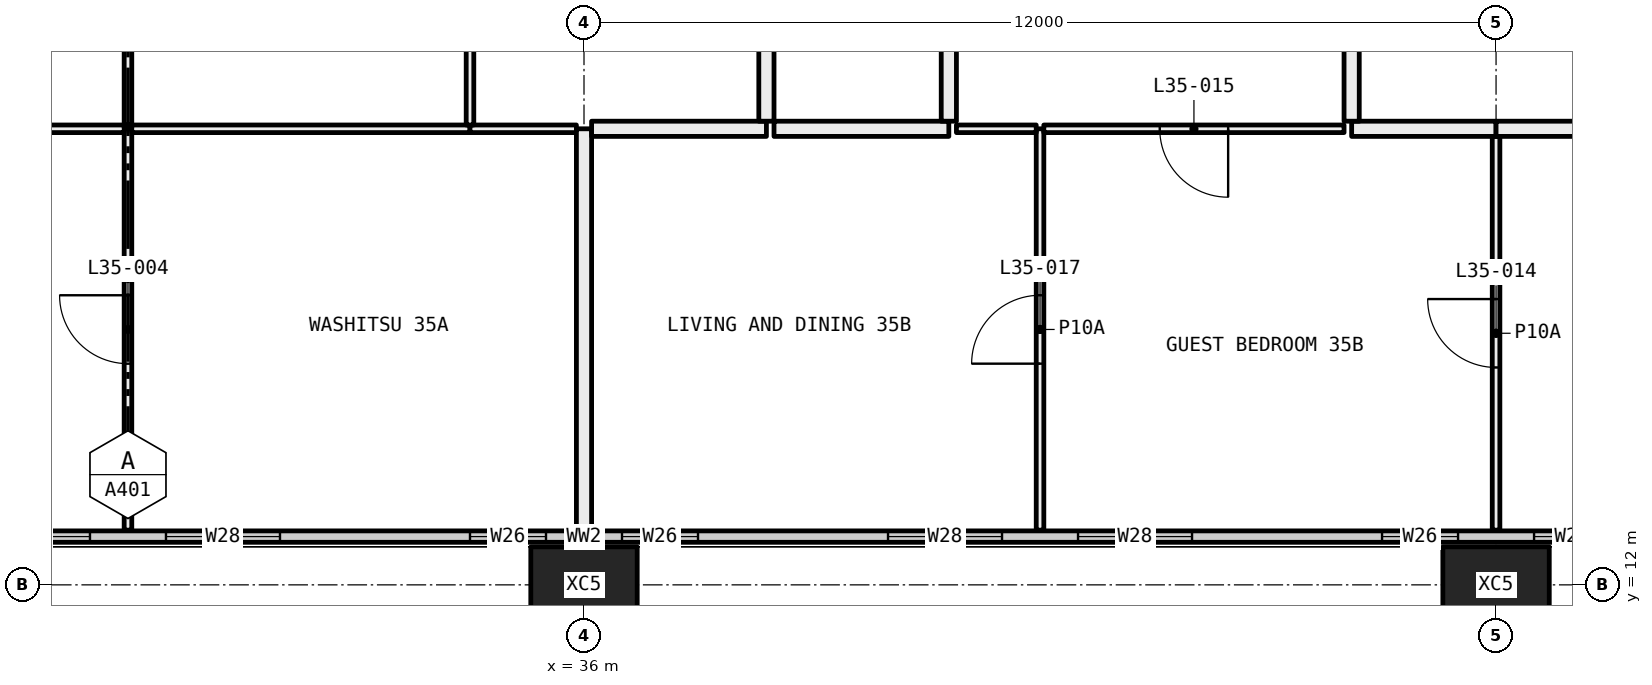
"""IFC4 building model, lengths in metres.
Left out: names, types, materials, properties, quantities, classifications, styles, units other than length and angle.
Written with IfcOpenShell. Run it as: python <this file> out.ifc"""

import sys

from ifc_helpers import new_model, si_unit, direction, frame, frame_2d, origin, origin_2d, place, context, subcontext, project, spatial, rectangle, hollow_rectangle, extrude, element, fill, save


model = new_model("IFC4")
c1 = context("Model", 3, precision=1e-05, world=origin(), true_north=direction((0.0, 1.0)))
c2 = subcontext(c1, "Body", "Model", "MODEL_VIEW")
j1 = project(units=[si_unit("LENGTHUNIT", "METRE"), si_unit("PLANEANGLEUNIT", "RADIAN")], contexts=[c1])
p1 = place(None, origin())
s1 = spatial("IfcSite", under=j1, at=p1, CompositionType="ELEMENT")
p2 = place(p1, origin())
s2 = spatial("IfcBuilding", under=s1, at=p2, CompositionType="ELEMENT")
p3 = place(p2, frame((0.0, 0.0, 134.55)))
s3 = spatial("IfcBuildingStorey", under=s2, at=p3, CompositionType="ELEMENT", Elevation=134.55)
for number, where, z_axis, x_axis in (
    (1, (36.0, 12.0, -0.4), (0.0, 0.0, 1.0), (1.0, 0.0, 0.0)),
    (2, (48.0, 12.0, -0.4), (0.0, 0.0, 1.0), (1.0, 0.0, 0.0)),
):
    element("IfcColumn", number, at=place(p3, frame(where, z_axis=z_axis, x_axis=x_axis)), inside=s3, PredefinedType="COLUMN", context=c2, shape_type="SweptSolid", body=[
        extrude(hollow_rectangle(XDim=1.4, YDim=1.0, WallThickness=0.055, at=origin_2d()), origin(), (0.0, 0.0, 1.0), 3.45),
    ])
p4 = place(p3, frame((6.56, 12.635, 0.0), z_axis=(0.0, 0.0, 1.0), x_axis=(1.0, 0.0, 0.0)))
e3 = element("IfcWall", 3, at=p4, inside=s3, PredefinedType="ELEMENTEDWALL", context=c2, shape_type="SweptSolid", body=[
    extrude(rectangle(XDim=58.88, YDim=0.15, at=frame_2d((29.44, 0.0))), origin(), (0.0, 0.0, 1.0), 3.05),
])
p5 = place(p4, frame((0.44, 0.0, 0.45)))
e4 = element("IfcOpeningElement", 4, at=p5, cuts=e3, PredefinedType="OPENING", context=c2, shape_type="SweptSolid", body=[
    extrude(rectangle(XDim=4.5, YDim=2.55, at=frame_2d((2.25, 1.275))), frame((0.0, 0.085, 0.0), z_axis=(0.0, -1.0, 0.0), x_axis=(1.0, 0.0, 0.0)), (0.0, 0.0, 1.0), 0.17),
])
p6 = place(p4, frame((5.94, 0.0, 0.45)))
e5 = element("IfcOpeningElement", 5, at=p6, cuts=e3, PredefinedType="OPENING", context=c2, shape_type="SweptSolid", body=[
    extrude(rectangle(XDim=1.0, YDim=2.55, at=frame_2d((0.5, 1.275))), frame((0.0, 0.085, 0.0), z_axis=(0.0, -1.0, 0.0), x_axis=(1.0, 0.0, 0.0)), (0.0, 0.0, 1.0), 0.17),
])
p7 = place(p4, frame((9.44, 0.0, 0.45)))
e6 = element("IfcOpeningElement", 6, at=p7, cuts=e3, PredefinedType="OPENING", context=c2, shape_type="SweptSolid", body=[
    extrude(rectangle(XDim=1.5, YDim=2.55, at=frame_2d((0.75, 1.275))), frame((0.0, 0.085, 0.0), z_axis=(0.0, -1.0, 0.0), x_axis=(1.0, 0.0, 0.0)), (0.0, 0.0, 1.0), 0.17),
])
p8 = place(p4, frame((11.94, 0.0, 0.45)))
e7 = element("IfcOpeningElement", 7, at=p8, cuts=e3, PredefinedType="OPENING", context=c2, shape_type="SweptSolid", body=[
    extrude(rectangle(XDim=1.5, YDim=2.55, at=frame_2d((0.75, 1.275))), frame((0.0, 0.085, 0.0), z_axis=(0.0, -1.0, 0.0), x_axis=(1.0, 0.0, 0.0)), (0.0, 0.0, 1.0), 0.17),
])
p9 = place(p4, frame((15.94, 0.0, 0.45)))
e8 = element("IfcOpeningElement", 8, at=p9, cuts=e3, PredefinedType="OPENING", context=c2, shape_type="SweptSolid", body=[
    extrude(rectangle(XDim=1.0, YDim=2.55, at=frame_2d((0.5, 1.275))), frame((0.0, 0.085, 0.0), z_axis=(0.0, -1.0, 0.0), x_axis=(1.0, 0.0, 0.0)), (0.0, 0.0, 1.0), 0.17),
])
p10 = place(p4, frame((17.94, 0.0, 0.45)))
e9 = element("IfcOpeningElement", 9, at=p10, cuts=e3, PredefinedType="OPENING", context=c2, shape_type="SweptSolid", body=[
    extrude(rectangle(XDim=1.0, YDim=2.55, at=frame_2d((0.5, 1.275))), frame((0.0, 0.085, 0.0), z_axis=(0.0, -1.0, 0.0), x_axis=(1.0, 0.0, 0.0)), (0.0, 0.0, 1.0), 0.17),
])
p11 = place(p4, frame((21.44, 0.0, 0.45)))
e10 = element("IfcOpeningElement", 10, at=p11, cuts=e3, PredefinedType="OPENING", context=c2, shape_type="SweptSolid", body=[
    extrude(rectangle(XDim=1.5, YDim=2.55, at=frame_2d((0.75, 1.275))), frame((0.0, 0.085, 0.0), z_axis=(0.0, -1.0, 0.0), x_axis=(1.0, 0.0, 0.0)), (0.0, 0.0, 1.0), 0.17),
])
p12 = place(p4, frame((23.94, 0.0, 0.45)))
e11 = element("IfcOpeningElement", 11, at=p12, cuts=e3, PredefinedType="OPENING", context=c2, shape_type="SweptSolid", body=[
    extrude(rectangle(XDim=1.5, YDim=2.55, at=frame_2d((0.75, 1.275))), frame((0.0, 0.085, 0.0), z_axis=(0.0, -1.0, 0.0), x_axis=(1.0, 0.0, 0.0)), (0.0, 0.0, 1.0), 0.17),
])
p13 = place(p4, frame((27.94, 0.0, 0.45)))
e12 = element("IfcOpeningElement", 12, at=p13, cuts=e3, PredefinedType="OPENING", context=c2, shape_type="SweptSolid", body=[
    extrude(rectangle(XDim=1.0, YDim=2.55, at=frame_2d((0.5, 1.275))), frame((0.0, 0.085, 0.0), z_axis=(0.0, -1.0, 0.0), x_axis=(1.0, 0.0, 0.0)), (0.0, 0.0, 1.0), 0.17),
])
p14 = place(p4, frame((29.94, 0.0, 0.45)))
e13 = element("IfcOpeningElement", 13, at=p14, cuts=e3, PredefinedType="OPENING", context=c2, shape_type="SweptSolid", body=[
    extrude(rectangle(XDim=1.0, YDim=2.55, at=frame_2d((0.5, 1.275))), frame((0.0, 0.085, 0.0), z_axis=(0.0, -1.0, 0.0), x_axis=(1.0, 0.0, 0.0)), (0.0, 0.0, 1.0), 0.17),
])
p15 = place(p4, frame((33.44, 0.0, 0.45)))
e14 = element("IfcOpeningElement", 14, at=p15, cuts=e3, PredefinedType="OPENING", context=c2, shape_type="SweptSolid", body=[
    extrude(rectangle(XDim=1.5, YDim=2.55, at=frame_2d((0.75, 1.275))), frame((0.0, 0.085, 0.0), z_axis=(0.0, -1.0, 0.0), x_axis=(1.0, 0.0, 0.0)), (0.0, 0.0, 1.0), 0.17),
])
p16 = place(p4, frame((35.94, 0.0, 0.45)))
e15 = element("IfcOpeningElement", 15, at=p16, cuts=e3, PredefinedType="OPENING", context=c2, shape_type="SweptSolid", body=[
    extrude(rectangle(XDim=1.5, YDim=2.55, at=frame_2d((0.75, 1.275))), frame((0.0, 0.085, 0.0), z_axis=(0.0, -1.0, 0.0), x_axis=(1.0, 0.0, 0.0)), (0.0, 0.0, 1.0), 0.17),
])
p17 = place(p4, frame((39.94, 0.0, 0.45)))
e16 = element("IfcOpeningElement", 16, at=p17, cuts=e3, PredefinedType="OPENING", context=c2, shape_type="SweptSolid", body=[
    extrude(rectangle(XDim=1.0, YDim=2.55, at=frame_2d((0.5, 1.275))), frame((0.0, 0.085, 0.0), z_axis=(0.0, -1.0, 0.0), x_axis=(1.0, 0.0, 0.0)), (0.0, 0.0, 1.0), 0.17),
])
p18 = place(p4, frame((41.94, 0.0, 0.45)))
e17 = element("IfcOpeningElement", 17, at=p18, cuts=e3, PredefinedType="OPENING", context=c2, shape_type="SweptSolid", body=[
    extrude(rectangle(XDim=1.0, YDim=2.55, at=frame_2d((0.5, 1.275))), frame((0.0, 0.085, 0.0), z_axis=(0.0, -1.0, 0.0), x_axis=(1.0, 0.0, 0.0)), (0.0, 0.0, 1.0), 0.17),
])
p19 = place(p4, frame((45.44, 0.0, 0.45)))
e18 = element("IfcOpeningElement", 18, at=p19, cuts=e3, PredefinedType="OPENING", context=c2, shape_type="SweptSolid", body=[
    extrude(rectangle(XDim=1.5, YDim=2.55, at=frame_2d((0.75, 1.275))), frame((0.0, 0.085, 0.0), z_axis=(0.0, -1.0, 0.0), x_axis=(1.0, 0.0, 0.0)), (0.0, 0.0, 1.0), 0.17),
])
p20 = place(p4, frame((47.94, 0.0, 0.45)))
e19 = element("IfcOpeningElement", 19, at=p20, cuts=e3, PredefinedType="OPENING", context=c2, shape_type="SweptSolid", body=[
    extrude(rectangle(XDim=1.5, YDim=2.55, at=frame_2d((0.75, 1.275))), frame((0.0, 0.085, 0.0), z_axis=(0.0, -1.0, 0.0), x_axis=(1.0, 0.0, 0.0)), (0.0, 0.0, 1.0), 0.17),
])
p21 = place(p4, frame((51.94, 0.0, 0.45)))
e20 = element("IfcOpeningElement", 20, at=p21, cuts=e3, PredefinedType="OPENING", context=c2, shape_type="SweptSolid", body=[
    extrude(rectangle(XDim=1.0, YDim=2.55, at=frame_2d((0.5, 1.275))), frame((0.0, 0.085, 0.0), z_axis=(0.0, -1.0, 0.0), x_axis=(1.0, 0.0, 0.0)), (0.0, 0.0, 1.0), 0.17),
])
p22 = place(p4, frame((53.94, 0.0, 0.45)))
e21 = element("IfcOpeningElement", 21, at=p22, cuts=e3, PredefinedType="OPENING", context=c2, shape_type="SweptSolid", body=[
    extrude(rectangle(XDim=4.5, YDim=2.55, at=frame_2d((2.25, 1.275))), frame((0.0, 0.085, 0.0), z_axis=(0.0, -1.0, 0.0), x_axis=(1.0, 0.0, 0.0)), (0.0, 0.0, 1.0), 0.17),
])
p23 = place(p3, frame((30.0, 12.72, 0.0), z_axis=(0.0, 0.0, 1.0), x_axis=(0.0, 1.0, 0.0)))
e22 = element("IfcWall", 22, at=p23, inside=s3, PredefinedType="PARTITIONING", context=c2, shape_type="SweptSolid", body=[
    extrude(rectangle(XDim=5.28, YDim=0.1, at=frame_2d((2.64, 0.0))), origin(), (0.0, 0.0, 1.0), 3.05),
])
p24 = place(p23, frame((2.19, 0.0, 0.0)))
e23 = element("IfcOpeningElement", 23, at=p24, cuts=e22, PredefinedType="OPENING", context=c2, shape_type="SweptSolid", body=[
    extrude(rectangle(XDim=0.9, YDim=2.1, at=frame_2d((0.45, 1.05))), frame((0.0, 0.06, 0.0), z_axis=(0.0, -1.0, 0.0), x_axis=(1.0, 0.0, 0.0)), (0.0, 0.0, 1.0), 0.12),
])
p25 = place(p3, frame((29.95, 18.0, 0.0), z_axis=(0.0, 0.0, 1.0), x_axis=(-1.0, 0.0, 0.0)))
e24 = element("IfcWall", 24, at=p25, inside=s3, PredefinedType="PARTITIONING", context=c2, shape_type="SweptSolid", body=[
    extrude(rectangle(XDim=3.95, YDim=0.1, at=frame_2d((1.975, 0.0))), origin(), (0.0, 0.0, 1.0), 3.05),
])
p26 = place(p25, frame((1.525, 0.0, 0.0)))
e25 = element("IfcOpeningElement", 25, at=p26, cuts=e24, PredefinedType="OPENING", context=c2, shape_type="SweptSolid", body=[
    extrude(rectangle(XDim=0.9, YDim=2.1, at=frame_2d((0.45, 1.05))), frame((0.0, 0.06, 0.0), z_axis=(0.0, -1.0, 0.0), x_axis=(1.0, 0.0, 0.0)), (0.0, 0.0, 1.0), 0.12),
])
p27 = place(p3, frame((34.5, 18.0, 0.0), z_axis=(0.0, 0.0, 1.0), x_axis=(-1.0, 0.0, 0.0)))
e26 = element("IfcWall", 26, at=p27, inside=s3, PredefinedType="PARTITIONING", context=c2, shape_type="SweptSolid", body=[
    extrude(rectangle(XDim=4.45, YDim=0.1, at=frame_2d((2.225, 0.0))), origin(), (0.0, 0.0, 1.0), 3.05),
])
p28 = place(p3, frame((35.9, 18.0, 0.0), z_axis=(0.0, 0.0, 1.0), x_axis=(-1.0, 0.0, 0.0)))
e27 = element("IfcWall", 27, at=p28, inside=s3, PredefinedType="PARTITIONING", context=c2, shape_type="SweptSolid", body=[
    extrude(rectangle(XDim=1.4, YDim=0.1, at=frame_2d((0.7, 0.0))), origin(), (0.0, 0.0, 1.0), 3.05),
])
p29 = place(p3, frame((36.0, 12.72, 0.0), z_axis=(0.0, 0.0, 1.0), x_axis=(0.0, 1.0, 0.0)))
e28 = element("IfcWall", 28, at=p29, inside=s3, PredefinedType="PARTITIONING", context=c2, shape_type="SweptSolid", body=[
    extrude(rectangle(XDim=5.28, YDim=0.2, at=frame_2d((2.64, 0.0))), origin(), (0.0, 0.0, 1.0), 2.45),
])
p30 = place(p3, frame((30.0, 18.05, 0.0), z_axis=(0.0, 0.0, 1.0), x_axis=(0.0, 1.0, 0.0)))
e29 = element("IfcWall", 29, at=p30, inside=s3, PredefinedType="PARTITIONING", context=c2, shape_type="SweptSolid", body=[
    extrude(rectangle(XDim=6.175, YDim=0.1, at=frame_2d((3.087, 0.0))), origin(), (0.0, 0.0, 1.0), 2.45),
])
p31 = place(p30, frame((2.637, 0.0, 0.0)))
e30 = element("IfcOpeningElement", 30, at=p31, cuts=e29, PredefinedType="OPENING", context=c2, shape_type="SweptSolid", body=[
    extrude(rectangle(XDim=0.9, YDim=2.1, at=frame_2d((0.45, 1.05))), frame((0.0, 0.06, 0.0), z_axis=(0.0, -1.0, 0.0), x_axis=(1.0, 0.0, 0.0)), (0.0, 0.0, 1.0), 0.12),
])
p32 = place(p3, frame((34.5, 18.05, 0.0), z_axis=(0.0, 0.0, 1.0), x_axis=(0.0, 1.0, 0.0)))
e31 = element("IfcWall", 31, at=p32, inside=s3, PredefinedType="PARTITIONING", context=c2, shape_type="SweptSolid", body=[
    extrude(rectangle(XDim=6.25, YDim=0.1, at=frame_2d((3.125, 0.0))), origin(), (0.0, 0.0, 1.0), 2.45),
])
p33 = place(p32, frame((2.675, 0.0, 0.0)))
e32 = element("IfcOpeningElement", 32, at=p33, cuts=e31, PredefinedType="OPENING", context=c2, shape_type="SweptSolid", body=[
    extrude(rectangle(XDim=0.9, YDim=2.1, at=frame_2d((0.45, 1.05))), frame((0.0, 0.06, 0.0), z_axis=(0.0, -1.0, 0.0), x_axis=(1.0, 0.0, 0.0)), (0.0, 0.0, 1.0), 0.12),
])
p34 = place(p3, frame((36.1, 18.0, 0.0), z_axis=(0.0, 0.0, 1.0), x_axis=(1.0, 0.0, 0.0)))
e33 = element("IfcWall", 33, at=p34, inside=s3, PredefinedType="PARTITIONING", context=c2, shape_type="SweptSolid", body=[
    extrude(rectangle(XDim=2.3, YDim=0.2, at=frame_2d((1.15, 0.0))), origin(), (0.0, 0.0, 1.0), 3.05),
])
p35 = place(p3, frame((38.4, 18.1, 0.0), z_axis=(0.0, 0.0, 1.0), x_axis=(0.0, 1.0, 0.0)))
e34 = element("IfcWall", 34, at=p35, inside=s3, PredefinedType="PARTITIONING", context=c2, shape_type="SweptSolid", body=[
    extrude(rectangle(XDim=6.2, YDim=0.2, at=frame_2d((3.1, 0.0))), origin(), (0.0, 0.0, 1.0), 2.45),
])
p36 = place(p3, frame((42.0, 12.72, 0.0), z_axis=(0.0, 0.0, 1.0), x_axis=(0.0, 1.0, 0.0)))
e35 = element("IfcWall", 35, at=p36, inside=s3, PredefinedType="PARTITIONING", context=c2, shape_type="SweptSolid", body=[
    extrude(rectangle(XDim=5.28, YDim=0.1, at=frame_2d((2.64, 0.0))), origin(), (0.0, 0.0, 1.0), 3.05),
])
p37 = place(p36, frame((2.19, 0.0, 0.0)))
e36 = element("IfcOpeningElement", 36, at=p37, cuts=e35, PredefinedType="OPENING", context=c2, shape_type="SweptSolid", body=[
    extrude(rectangle(XDim=0.9, YDim=2.1, at=frame_2d((0.45, 1.05))), frame((0.0, 0.06, 0.0), z_axis=(0.0, -1.0, 0.0), x_axis=(1.0, 0.0, 0.0)), (0.0, 0.0, 1.0), 0.12),
])
p38 = place(p3, frame((41.95, 18.0, 0.0), z_axis=(0.0, 0.0, 1.0), x_axis=(-1.0, 0.0, 0.0)))
e37 = element("IfcWall", 37, at=p38, inside=s3, PredefinedType="PARTITIONING", context=c2, shape_type="SweptSolid", body=[
    extrude(rectangle(XDim=1.05, YDim=0.1, at=frame_2d((0.525, 0.0))), origin(), (0.0, 0.0, 1.0), 3.05),
])
p39 = place(p3, frame((40.8, 18.0, 0.0), z_axis=(0.0, 0.0, 1.0), x_axis=(-1.0, 0.0, 0.0)))
e38 = element("IfcWall", 38, at=p39, inside=s3, PredefinedType="PARTITIONING", context=c2, shape_type="SweptSolid", body=[
    extrude(rectangle(XDim=2.3, YDim=0.2, at=frame_2d((1.15, 0.0))), origin(), (0.0, 0.0, 1.0), 3.05),
])
p40 = place(p3, frame((48.0, 12.72, 0.0), z_axis=(0.0, 0.0, 1.0), x_axis=(0.0, 1.0, 0.0)))
e39 = element("IfcWall", 39, at=p40, inside=s3, PredefinedType="PARTITIONING", context=c2, shape_type="SweptSolid", body=[
    extrude(rectangle(XDim=5.18, YDim=0.1, at=frame_2d((2.59, 0.0))), origin(), (0.0, 0.0, 1.0), 3.05),
])
p41 = place(p40, frame((2.14, 0.0, 0.0)))
e40 = element("IfcOpeningElement", 40, at=p41, cuts=e39, PredefinedType="OPENING", context=c2, shape_type="SweptSolid", body=[
    extrude(rectangle(XDim=0.9, YDim=2.1, at=frame_2d((0.45, 1.05))), frame((0.0, 0.06, 0.0), z_axis=(0.0, -1.0, 0.0), x_axis=(1.0, 0.0, 0.0)), (0.0, 0.0, 1.0), 0.12),
])
p42 = place(p3, frame((46.0, 18.0, 0.0), z_axis=(0.0, 0.0, 1.0), x_axis=(-1.0, 0.0, 0.0)))
e41 = element("IfcWall", 41, at=p42, inside=s3, PredefinedType="PARTITIONING", context=c2, shape_type="SweptSolid", body=[
    extrude(rectangle(XDim=3.95, YDim=0.1, at=frame_2d((1.975, 0.0))), origin(), (0.0, 0.0, 1.0), 3.05),
])
p43 = place(p42, frame((1.525, 0.0, 0.0)))
e42 = element("IfcOpeningElement", 42, at=p43, cuts=e41, PredefinedType="OPENING", context=c2, shape_type="SweptSolid", body=[
    extrude(rectangle(XDim=0.9, YDim=2.1, at=frame_2d((0.45, 1.05))), frame((0.0, 0.06, 0.0), z_axis=(0.0, -1.0, 0.0), x_axis=(1.0, 0.0, 0.0)), (0.0, 0.0, 1.0), 0.12),
])
p44 = place(p3, frame((48.0, 18.0, 0.0), z_axis=(0.0, 0.0, 1.0), x_axis=(-1.0, 0.0, 0.0)))
e43 = element("IfcWall", 43, at=p44, inside=s3, PredefinedType="PARTITIONING", context=c2, shape_type="SweptSolid", body=[
    extrude(rectangle(XDim=1.9, YDim=0.2, at=frame_2d((0.95, 0.0))), origin(), (0.0, 0.0, 1.0), 3.05),
])
p45 = place(p3, frame((54.0, 18.0, 0.0), z_axis=(0.0, 0.0, 1.0), x_axis=(-1.0, 0.0, 0.0)))
e44 = element("IfcWall", 44, at=p45, inside=s3, PredefinedType="PARTITIONING", context=c2, shape_type="SweptSolid", body=[
    extrude(rectangle(XDim=6.0, YDim=0.2, at=frame_2d((3.0, 0.0))), origin(), (0.0, 0.0, 1.0), 3.05),
])
p46 = place(p3, frame((40.8, 23.9, 0.0), z_axis=(0.0, 0.0, 1.0), x_axis=(0.0, -1.0, 0.0)))
e45 = element("IfcWall", 45, at=p46, inside=s3, PredefinedType="PARTITIONING", context=c2, shape_type="SweptSolid", body=[
    extrude(rectangle(XDim=5.8, YDim=0.2, at=frame_2d((2.9, 0.0))), origin(), (0.0, 0.0, 1.0), 3.05),
])
p47 = place(p3, frame((46.1, 18.1, 0.0), z_axis=(0.0, 0.0, 1.0), x_axis=(0.0, 1.0, 0.0)))
e46 = element("IfcWall", 46, at=p47, inside=s3, PredefinedType="PARTITIONING", context=c2, shape_type="SweptSolid", body=[
    extrude(rectangle(XDim=6.2, YDim=0.2, at=frame_2d((3.1, 0.0))), origin(), (0.0, 0.0, 1.0), 2.45),
])
p48 = place(p11, origin())
e47 = element("IfcWindow", 47, at=p48, inside=s3, PartitioningType="SINGLE_PANEL", PredefinedType="WINDOW", context=c2, shape_type="SweptSolid", body=[
    extrude(rectangle(XDim=1.5, YDim=2.55, at=frame_2d((0.75, 1.275))), frame((0.0, 0.03, 0.0), z_axis=(0.0, -1.0, 0.0), x_axis=(1.0, 0.0, 0.0)), (0.0, 0.0, 1.0), 0.06),
])
fill(e10, e47)
p49 = place(p12, origin())
e48 = element("IfcWindow", 48, at=p49, inside=s3, PartitioningType="SINGLE_PANEL", PredefinedType="WINDOW", context=c2, shape_type="SweptSolid", body=[
    extrude(rectangle(XDim=1.5, YDim=2.55, at=frame_2d((0.75, 1.275))), frame((0.0, 0.03, 0.0), z_axis=(0.0, -1.0, 0.0), x_axis=(1.0, 0.0, 0.0)), (0.0, 0.0, 1.0), 0.06),
])
fill(e11, e48)
p50 = place(p13, origin())
e49 = element("IfcWindow", 49, at=p50, inside=s3, PartitioningType="SINGLE_PANEL", PredefinedType="WINDOW", context=c2, shape_type="SweptSolid", body=[
    extrude(rectangle(XDim=1.0, YDim=2.55, at=frame_2d((0.5, 1.275))), frame((0.0, 0.03, 0.0), z_axis=(0.0, -1.0, 0.0), x_axis=(1.0, 0.0, 0.0)), (0.0, 0.0, 1.0), 0.06),
])
fill(e12, e49)
p51 = place(p14, origin())
e50 = element("IfcWindow", 50, at=p51, inside=s3, PartitioningType="SINGLE_PANEL", PredefinedType="WINDOW", context=c2, shape_type="SweptSolid", body=[
    extrude(rectangle(XDim=1.0, YDim=2.55, at=frame_2d((0.5, 1.275))), frame((0.0, 0.03, 0.0), z_axis=(0.0, -1.0, 0.0), x_axis=(1.0, 0.0, 0.0)), (0.0, 0.0, 1.0), 0.06),
])
fill(e13, e50)
p52 = place(p15, origin())
e51 = element("IfcWindow", 51, at=p52, inside=s3, PartitioningType="SINGLE_PANEL", PredefinedType="WINDOW", context=c2, shape_type="SweptSolid", body=[
    extrude(rectangle(XDim=1.5, YDim=2.55, at=frame_2d((0.75, 1.275))), frame((0.0, 0.03, 0.0), z_axis=(0.0, -1.0, 0.0), x_axis=(1.0, 0.0, 0.0)), (0.0, 0.0, 1.0), 0.06),
])
fill(e14, e51)
p53 = place(p16, origin())
e52 = element("IfcWindow", 52, at=p53, inside=s3, PartitioningType="SINGLE_PANEL", PredefinedType="WINDOW", context=c2, shape_type="SweptSolid", body=[
    extrude(rectangle(XDim=1.5, YDim=2.55, at=frame_2d((0.75, 1.275))), frame((0.0, 0.03, 0.0), z_axis=(0.0, -1.0, 0.0), x_axis=(1.0, 0.0, 0.0)), (0.0, 0.0, 1.0), 0.06),
])
fill(e15, e52)
p54 = place(p17, origin())
e53 = element("IfcWindow", 53, at=p54, inside=s3, PartitioningType="SINGLE_PANEL", PredefinedType="WINDOW", context=c2, shape_type="SweptSolid", body=[
    extrude(rectangle(XDim=1.0, YDim=2.55, at=frame_2d((0.5, 1.275))), frame((0.0, 0.03, 0.0), z_axis=(0.0, -1.0, 0.0), x_axis=(1.0, 0.0, 0.0)), (0.0, 0.0, 1.0), 0.06),
])
fill(e16, e53)
p55 = place(p18, origin())
e54 = element("IfcWindow", 54, at=p55, inside=s3, PartitioningType="SINGLE_PANEL", PredefinedType="WINDOW", context=c2, shape_type="SweptSolid", body=[
    extrude(rectangle(XDim=1.0, YDim=2.55, at=frame_2d((0.5, 1.275))), frame((0.0, 0.03, 0.0), z_axis=(0.0, -1.0, 0.0), x_axis=(1.0, 0.0, 0.0)), (0.0, 0.0, 1.0), 0.06),
])
fill(e17, e54)
p56 = place(p24, origin())
e55 = element("IfcDoor", 55, at=p56, inside=s3, OperationType="SINGLE_SWING_LEFT", PredefinedType="DOOR", context=c2, shape_type="SweptSolid", body=[
    extrude(rectangle(XDim=0.9, YDim=2.1, at=frame_2d((0.45, 1.05))), frame((0.0, 0.025, 0.0), z_axis=(0.0, -1.0, 0.0), x_axis=(1.0, 0.0, 0.0)), (0.0, 0.0, 1.0), 0.05),
])
fill(e23, e55)
p57 = place(p41, origin())
e56 = element("IfcDoor", 56, at=p57, inside=s3, OperationType="SINGLE_SWING_LEFT", PredefinedType="DOOR", context=c2, shape_type="SweptSolid", body=[
    extrude(rectangle(XDim=0.9, YDim=2.1, at=frame_2d((0.45, 1.05))), frame((0.0, 0.025, 0.0), z_axis=(0.0, -1.0, 0.0), x_axis=(1.0, 0.0, 0.0)), (0.0, 0.0, 1.0), 0.05),
])
fill(e40, e56)
p58 = place(p43, origin())
e57 = element("IfcDoor", 57, at=p58, inside=s3, OperationType="SINGLE_SWING_RIGHT", PredefinedType="DOOR", context=c2, shape_type="SweptSolid", body=[
    extrude(rectangle(XDim=0.9, YDim=2.1, at=frame_2d((0.45, 1.05))), frame((0.0, 0.025, 0.0), z_axis=(0.0, -1.0, 0.0), x_axis=(1.0, 0.0, 0.0)), (0.0, 0.0, 1.0), 0.05),
])
fill(e42, e57)
p59 = place(p37, origin())
e58 = element("IfcDoor", 58, at=p59, inside=s3, OperationType="SINGLE_SWING_RIGHT", PredefinedType="DOOR", context=c2, shape_type="SweptSolid", body=[
    extrude(rectangle(XDim=0.9, YDim=2.1, at=frame_2d((0.45, 1.05))), frame((0.0, 0.025, 0.0), z_axis=(0.0, -1.0, 0.0), x_axis=(1.0, 0.0, 0.0)), (0.0, 0.0, 1.0), 0.05),
])
fill(e36, e58)
save(model, sys.argv[1])
